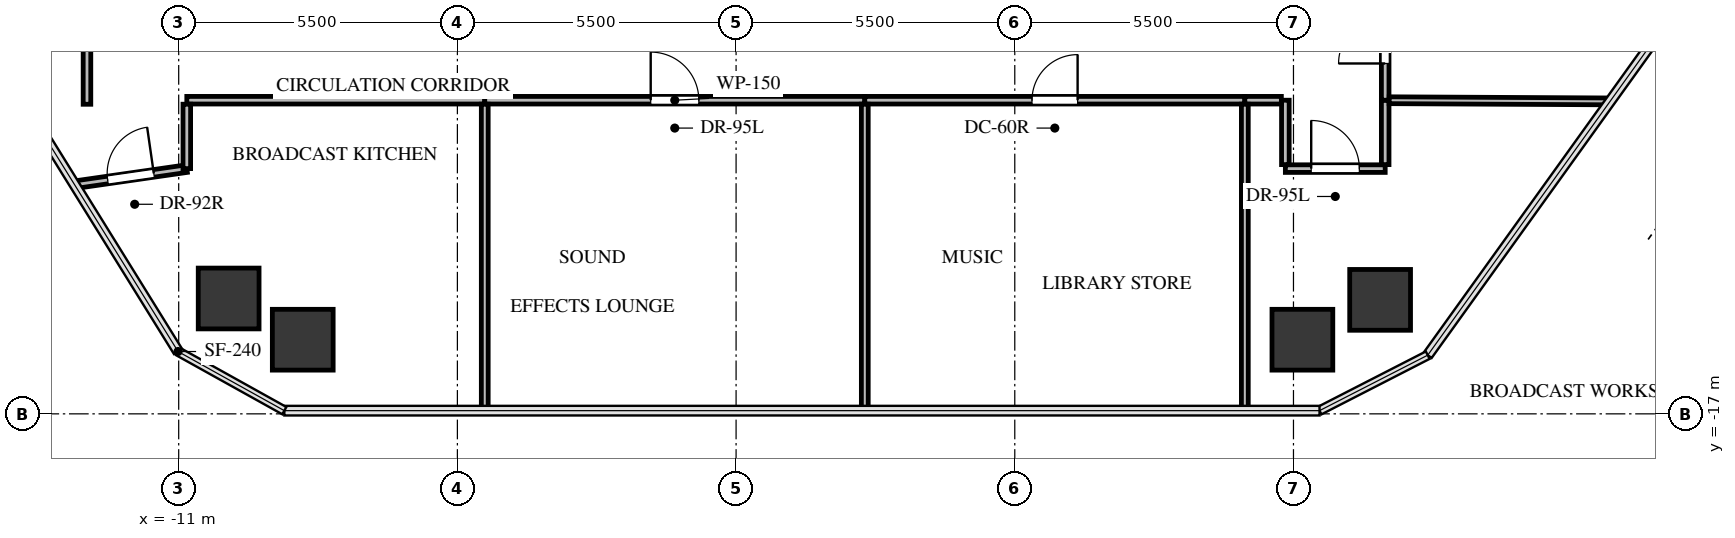
"""IFC4 building model, lengths in metres.
Left out: names, types, materials, properties, quantities, classifications, styles, units other than length and angle.
Written with IfcOpenShell. Run it as: python <this file> out.ifc"""

import sys

from ifc_helpers import new_model, si_unit, direction, frame, frame_2d, origin, origin_2d, place, context, subcontext, project, spatial, rectangle, extrude, source, transform, mapped, element, fill, save


model = new_model("IFC4")
c1 = context("Model", 3, precision=1e-05, world=origin(), true_north=direction((0.0, 1.0)))
c2 = subcontext(c1, "Body", "Model", "MODEL_VIEW")
j1 = project(units=[si_unit("LENGTHUNIT", "METRE"), si_unit("PLANEANGLEUNIT", "RADIAN")], contexts=[c1])
p1 = place(None, origin())
s1 = spatial("IfcSite", under=j1, at=p1, CompositionType="ELEMENT")
p2 = place(p1, origin())
s2 = spatial("IfcBuilding", under=s1, at=p2, CompositionType="ELEMENT")
p3 = place(p2, frame((0.0, 0.0, 127.2)))
s3 = spatial("IfcBuildingStorey", under=s2, at=p3, CompositionType="ELEMENT", Elevation=127.2)
m1 = source(origin(), c2, "Body", "SweptSolid", [
    extrude(rectangle(XDim=1.2, YDim=1.2, at=origin_2d()), origin(), (0.0, 0.0, 1.0), 3.3),
])
for number, where, z_axis, x_axis in (
    (1, (-10.014, -14.723, -0.24), (0.0, 0.0, 1.0), (1.0, 0.0, 0.0)),
    (2, (12.71, -14.75, -0.24), (0.0, 0.0, 1.0), (1.0, 0.0, 0.0)),
    (3, (11.176, -15.537, -0.24), (0.0, 0.0, 1.0), (1.0, 0.0, 0.0)),
    (4, (-8.552, -15.537, -0.24), (0.0, 0.0, 1.0), (1.0, 0.0, 0.0)),
):
    element("IfcColumn", number, at=place(p3, frame(where, z_axis=z_axis, x_axis=x_axis)), inside=s3, PredefinedType="COLUMN", context=c2, shape_type="MappedRepresentation", body=[
        mapped(m1, transform((0.0, 0.0, 0.0), x_axis=(1.0, 0.0, 0.0), y_axis=(0.0, 1.0, 0.0), z_axis=(0.0, 0.0, 1.0), scale=1.0)),
    ])
p4 = place(p3, frame((-10.84, -10.81, 0.0), z_axis=(0.0, 0.0, 1.0), x_axis=(1.0, 0.0, 0.0)))
e5 = element("IfcWall", 5, at=p4, inside=s3, PredefinedType="PARTITIONING", context=c2, shape_type="SweptSolid", body=[
    extrude(rectangle(XDim=5.88, YDim=0.15, at=frame_2d((2.94, 0.0))), origin(), (0.0, 0.0, 1.0), 2.212),
])
p5 = place(p3, frame((-13.054, -12.479, 0.0), z_axis=(0.0, 0.0, 1.0), x_axis=(0.989787303338, 0.142552075227, 0.0)))
e6 = element("IfcWall", 6, at=p5, inside=s3, PredefinedType="PARTITIONING", context=c2, shape_type="SweptSolid", body=[
    extrude(rectangle(XDim=2.237, YDim=0.15, at=frame_2d((1.118, 0.0))), origin(), (0.0, 0.0, 1.0), 2.38),
])
p6 = place(p5, frame((0.658, 0.0, 0.0)))
e7 = element("IfcOpeningElement", 7, at=p6, cuts=e6, PredefinedType="OPENING", context=c2, shape_type="SweptSolid", body=[
    extrude(rectangle(XDim=0.92, YDim=2.1, at=frame_2d((0.46, 1.05))), frame((0.0, 0.085, 0.0), z_axis=(0.0, -1.0, 0.0), x_axis=(1.0, 0.0, 0.0)), (0.0, 0.0, 1.0), 0.17),
])
p7 = place(p3, frame((-10.84, -12.16, 0.0), z_axis=(0.0, 0.0, 1.0), x_axis=(0.0, 1.0, 0.0)))
e8 = element("IfcWall", 8, at=p7, inside=s3, PredefinedType="PARTITIONING", context=c2, shape_type="SweptSolid", body=[
    extrude(rectangle(XDim=1.271, YDim=0.15, at=frame_2d((0.635, 0.0))), origin(), (0.0, 0.0, 1.0), 3.045),
])
p8 = place(p3, frame((-4.96, -10.81, 0.0), z_axis=(0.0, 0.0, 1.0), x_axis=(1.0, 0.0, 0.0)))
e9 = element("IfcWall", 9, at=p8, inside=s3, PredefinedType="PARTITIONING", context=c2, shape_type="SweptSolid", body=[
    extrude(rectangle(XDim=7.5, YDim=0.15, at=frame_2d((3.75, 0.0))), origin(), (0.0, 0.0, 1.0), 2.212),
])
p9 = place(p8, frame((3.275, 0.0, 0.0)))
e10 = element("IfcOpeningElement", 10, at=p9, cuts=e9, PredefinedType="OPENING", context=c2, shape_type="SweptSolid", body=[
    extrude(rectangle(XDim=0.95, YDim=2.1, at=frame_2d((0.475, 1.05))), frame((0.0, 0.085, 0.0), z_axis=(0.0, -1.0, 0.0), x_axis=(1.0, 0.0, 0.0)), (0.0, 0.0, 1.0), 0.17),
])
p10 = place(p3, frame((2.54, -10.81, 0.0), z_axis=(0.0, 0.0, 1.0), x_axis=(1.0, 0.0, 0.0)))
e11 = element("IfcWall", 11, at=p10, inside=s3, PredefinedType="PARTITIONING", context=c2, shape_type="SweptSolid", body=[
    extrude(rectangle(XDim=7.5, YDim=0.15, at=frame_2d((3.75, 0.0))), origin(), (0.0, 0.0, 1.0), 2.212),
])
p11 = place(p10, frame((3.3, 0.0, 0.0)))
e12 = element("IfcOpeningElement", 12, at=p11, cuts=e11, PredefinedType="OPENING", context=c2, shape_type="SweptSolid", body=[
    extrude(rectangle(XDim=0.9, YDim=2.05, at=frame_2d((0.45, 1.025))), frame((0.0, 0.085, 0.0), z_axis=(0.0, -1.0, 0.0), x_axis=(1.0, 0.0, 0.0)), (0.0, 0.0, 1.0), 0.17),
])
p12 = place(p3, frame((10.84, -12.16, 0.0), z_axis=(0.0, 0.0, 1.0), x_axis=(1.0, 0.0, 0.0)))
e13 = element("IfcWall", 13, at=p12, inside=s3, PredefinedType="PARTITIONING", context=c2, shape_type="SweptSolid", body=[
    extrude(rectangle(XDim=1.97, YDim=0.15, at=frame_2d((0.985, 0.0))), origin(), (0.0, 0.0, 1.0), 3.045),
])
p13 = place(p12, frame((0.51, 0.0, 0.0)))
e14 = element("IfcOpeningElement", 14, at=p13, cuts=e13, PredefinedType="OPENING", context=c2, shape_type="SweptSolid", body=[
    extrude(rectangle(XDim=0.95, YDim=2.1, at=frame_2d((0.475, 1.05))), frame((0.0, 0.085, 0.0), z_axis=(0.0, -1.0, 0.0), x_axis=(1.0, 0.0, 0.0)), (0.0, 0.0, 1.0), 0.17),
])
for number, where, z_axis, x_axis in (
    (15, (10.84, -10.81, 0.0), (0.0, 0.0, 1.0), (0.0, -1.0, 0.0)),
    (16, (12.81, -12.081, 0.0), (0.0, 0.0, 1.0), (0.0, 1.0, 0.0)),
):
    element("IfcWall", number, at=place(p3, frame(where, z_axis=z_axis, x_axis=x_axis)), inside=s3, PredefinedType="PARTITIONING", context=c2, shape_type="SweptSolid", body=[
        extrude(rectangle(XDim=1.271, YDim=0.15, at=frame_2d((0.635, 0.0))), origin(), (0.0, 0.0, 1.0), 3.045),
    ])
p14 = place(p3, frame((10.04, -10.81, 0.0), z_axis=(0.0, 0.0, 1.0), x_axis=(1.0, 0.0, 0.0)))
e17 = element("IfcWall", 17, at=p14, inside=s3, PredefinedType="PARTITIONING", context=c2, shape_type="SweptSolid", body=[
    extrude(rectangle(XDim=0.721, YDim=0.15, at=frame_2d((0.36, 0.0))), origin(), (0.0, 0.0, 1.0), 3.045),
])
p15 = place(p3, frame((-12.81, -6.46, 0.0), z_axis=(0.0, 0.0, 1.0), x_axis=(0.0, -1.0, 0.0)))
e18 = element("IfcWall", 18, at=p15, inside=s3, PredefinedType="PARTITIONING", context=c2, shape_type="SweptSolid", body=[
    extrude(rectangle(XDim=4.43, YDim=0.15, at=frame_2d((2.215, 0.0))), origin(), (0.0, 0.0, 1.0), 2.38),
])
p16 = place(p15, frame((1.415, 0.0, 0.0)))
e19 = element("IfcOpeningElement", 19, at=p16, cuts=e18, PredefinedType="OPENING", context=c2, shape_type="SweptSolid", body=[
    extrude(rectangle(XDim=1.6, YDim=2.15, at=frame_2d((0.8, 1.075))), frame((0.0, 0.085, 0.0), z_axis=(0.0, -1.0, 0.0), x_axis=(1.0, 0.0, 0.0)), (0.0, 0.0, 1.0), 0.17),
])
p17 = place(p3, frame((12.81, -10.81, 0.0), z_axis=(0.0, 0.0, 1.0), x_axis=(0.0, 1.0, 0.0)))
e20 = element("IfcWall", 20, at=p17, inside=s3, PredefinedType="PARTITIONING", context=c2, shape_type="SweptSolid", body=[
    extrude(rectangle(XDim=2.37, YDim=0.15, at=frame_2d((1.185, 0.0))), origin(), (0.0, 0.0, 1.0), 3.045),
])
p18 = place(p17, frame((0.725, 0.0, 0.0)))
e21 = element("IfcOpeningElement", 21, at=p18, cuts=e20, PredefinedType="OPENING", context=c2, shape_type="SweptSolid", body=[
    extrude(rectangle(XDim=0.92, YDim=2.1, at=frame_2d((0.46, 1.05))), frame((0.0, 0.085, 0.0), z_axis=(0.0, -1.0, 0.0), x_axis=(1.0, 0.0, 0.0)), (0.0, 0.0, 1.0), 0.17),
])
p19 = place(p3, frame((-4.96, -10.889, 0.0), z_axis=(0.0, 0.0, 1.0), x_axis=(0.0, -1.0, 0.0)))
e22 = element("IfcWall", 22, at=p19, inside=s3, PredefinedType="PARTITIONING", context=c2, shape_type="SweptSolid", body=[
    extrude(rectangle(XDim=6.048, YDim=0.135, at=frame_2d((3.024, 0.0))), origin(), (0.0, 0.0, 1.0), 2.212),
])
p20 = place(p3, frame((2.54, -10.889, 0.0), z_axis=(0.0, 0.0, 1.0), x_axis=(0.0, -1.0, 0.0)))
e23 = element("IfcWall", 23, at=p20, inside=s3, PredefinedType="PARTITIONING", context=c2, shape_type="SweptSolid", body=[
    extrude(rectangle(XDim=6.048, YDim=0.135, at=frame_2d((3.024, 0.0))), origin(), (0.0, 0.0, 1.0), 2.38),
])
p21 = place(p3, frame((10.04, -10.889, 0.0), z_axis=(0.0, 0.0, 1.0), x_axis=(0.0, -1.0, 0.0)))
e24 = element("IfcWall", 24, at=p21, inside=s3, PredefinedType="PARTITIONING", context=c2, shape_type="SweptSolid", body=[
    extrude(rectangle(XDim=6.048, YDim=0.135, at=frame_2d((3.024, 0.0))), origin(), (0.0, 0.0, 1.0), 2.212),
])
p22 = place(p3, frame((12.889, -10.81, 0.0), z_axis=(0.0, 0.0, 1.0), x_axis=(0.999986140562, -0.005264853658, 0.0)))
e25 = element("IfcWall", 25, at=p22, inside=s3, PredefinedType="PARTITIONING", context=c2, shape_type="SweptSolid", body=[
    extrude(rectangle(XDim=4.359, YDim=0.135, at=frame_2d((2.179, 0.0))), origin(), (0.0, 0.0, 1.0), 2.38),
])
m2 = source(origin(), c2, "Body", "SweptSolid", [
    extrude(rectangle(XDim=0.92, YDim=2.1, at=frame_2d((0.46, 1.05))), frame((0.0, 0.025, 0.0), z_axis=(0.0, -1.0, 0.0), x_axis=(1.0, 0.0, 0.0)), (0.0, 0.0, 1.0), 0.05),
])
p23 = place(p6, origin())
e26 = element("IfcDoor", 26, at=p23, inside=s3, OperationType="SINGLE_SWING_RIGHT", PredefinedType="DOOR", context=c2, shape_type="MappedRepresentation", body=[
    mapped(m2, transform((0.0, 0.0, 0.0), x_axis=(1.0, 0.0, 0.0), y_axis=(0.0, 1.0, 0.0), z_axis=(0.0, 0.0, 1.0), scale=1.0)),
])
fill(e7, e26)
m3 = source(origin(), c2, "Body", "SweptSolid", [
    extrude(rectangle(XDim=0.95, YDim=2.1, at=frame_2d((0.475, 1.05))), frame((0.0, 0.025, 0.0), z_axis=(0.0, -1.0, 0.0), x_axis=(1.0, 0.0, 0.0)), (0.0, 0.0, 1.0), 0.05),
])
p24 = place(p9, origin())
e27 = element("IfcDoor", 27, at=p24, inside=s3, OperationType="SINGLE_SWING_LEFT", PredefinedType="DOOR", context=c2, shape_type="MappedRepresentation", body=[
    mapped(m3, transform((0.0, 0.0, 0.0), x_axis=(1.0, 0.0, 0.0), y_axis=(0.0, 1.0, 0.0), z_axis=(0.0, 0.0, 1.0), scale=1.0)),
])
fill(e10, e27)
m4 = source(origin(), c2, "Body", "SweptSolid", [
    extrude(rectangle(XDim=0.9, YDim=2.05, at=frame_2d((0.45, 1.025))), frame((0.0, 0.025, 0.0), z_axis=(0.0, -1.0, 0.0), x_axis=(1.0, 0.0, 0.0)), (0.0, 0.0, 1.0), 0.05),
])
p25 = place(p11, origin())
e28 = element("IfcDoor", 28, at=p25, inside=s3, OperationType="SINGLE_SWING_RIGHT", PredefinedType="DOOR", context=c2, shape_type="MappedRepresentation", body=[
    mapped(m4, transform((0.0, 0.0, 0.0), x_axis=(1.0, 0.0, 0.0), y_axis=(0.0, 1.0, 0.0), z_axis=(0.0, 0.0, 1.0), scale=1.0)),
])
fill(e12, e28)
p26 = place(p13, origin())
e29 = element("IfcDoor", 29, at=p26, inside=s3, OperationType="SINGLE_SWING_LEFT", PredefinedType="DOOR", context=c2, shape_type="MappedRepresentation", body=[
    mapped(m3, transform((0.0, 0.0, 0.0), x_axis=(1.0, 0.0, 0.0), y_axis=(0.0, 1.0, 0.0), z_axis=(0.0, 0.0, 1.0), scale=1.0)),
])
fill(e14, e29)
m5 = source(origin(), c2, "Body", "SweptSolid", [
    extrude(rectangle(XDim=0.92, YDim=2.1, at=frame_2d((0.46, 1.05))), frame((0.0, 0.025, 0.0), z_axis=(0.0, -1.0, 0.0), x_axis=(1.0, 0.0, 0.0)), (0.0, 0.0, 1.0), 0.05),
])
p27 = place(p18, origin())
e30 = element("IfcDoor", 30, at=p27, inside=s3, OperationType="SINGLE_SWING_LEFT", PredefinedType="DOOR", context=c2, shape_type="MappedRepresentation", body=[
    mapped(m5, transform((0.0, 0.0, 0.0), x_axis=(1.0, 0.0, 0.0), y_axis=(0.0, 1.0, 0.0), z_axis=(0.0, 0.0, 1.0), scale=1.0)),
])
fill(e21, e30)
save(model, sys.argv[1])
